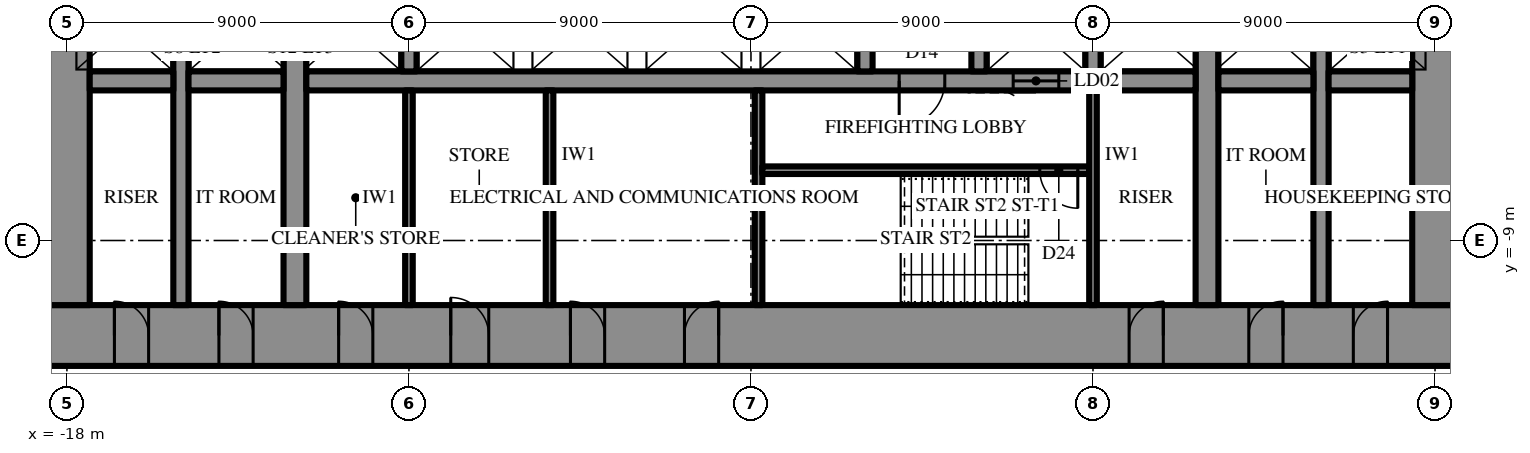
"""IFC4 building model, lengths in metres.
Left out: names, types, materials, properties, quantities, classifications, styles, units other than length and angle.
Written with IfcOpenShell. Run it as: python <this file> out.ifc"""

import sys

from ifc_helpers import new_model, si_unit, direction, frame, frame_2d, origin, place, context, subcontext, project, spatial, rectangle, extrude, element, fill, save


model = new_model("IFC4")
c1 = context("Model", 3, precision=1e-05, world=origin(), true_north=direction((0.0, 1.0)))
c2 = subcontext(c1, "Body", "Model", "MODEL_VIEW")
j1 = project(units=[si_unit("LENGTHUNIT", "METRE"), si_unit("PLANEANGLEUNIT", "RADIAN")], contexts=[c1])
p1 = place(None, origin())
s1 = spatial("IfcSite", under=j1, at=p1, CompositionType="ELEMENT")
p2 = place(p1, origin())
s2 = spatial("IfcBuilding", under=s1, at=p2, CompositionType="ELEMENT")
p3 = place(p2, frame((0.0, 0.0, -4.5)))
s3 = spatial("IfcBuildingStorey", under=s2, at=p3, CompositionType="ELEMENT", Elevation=-4.5)
p4 = place(p3, frame((18.6, -11.5, 0.0), z_axis=(0.0, 0.0, 1.0), x_axis=(-1.0, 0.0, 0.0)))
e1 = element("IfcWall", 1, at=p4, inside=s3, PredefinedType="SHEAR", context=c2, shape_type="SweptSolid", body=[
    extrude(rectangle(XDim=37.2, YDim=1.6, at=frame_2d((18.6, 0.0))), origin(), (0.0, 0.0, 1.0), 4.5),
])
p5 = place(p4, frame((19.45, 0.0, 0.0)))
e2 = element("IfcOpeningElement", 2, at=p5, cuts=e1, PredefinedType="OPENING", context=c2, shape_type="SweptSolid", body=[
    extrude(rectangle(XDim=0.9, YDim=2.2, at=frame_2d((0.45, 1.1))), frame((0.0, 0.81, 0.0), z_axis=(0.0, -1.0, 0.0), x_axis=(1.0, 0.0, 0.0)), (0.0, 0.0, 1.0), 1.62),
])
p6 = place(p4, frame((22.45, 0.0, 0.0)))
e3 = element("IfcOpeningElement", 3, at=p6, cuts=e1, PredefinedType="OPENING", context=c2, shape_type="SweptSolid", body=[
    extrude(rectangle(XDim=0.9, YDim=2.2, at=frame_2d((0.45, 1.1))), frame((0.0, 0.81, 0.0), z_axis=(0.0, -1.0, 0.0), x_axis=(1.0, 0.0, 0.0)), (0.0, 0.0, 1.0), 1.62),
])
p7 = place(p4, frame((25.5, 0.0, 0.0)))
e4 = element("IfcOpeningElement", 4, at=p7, cuts=e1, PredefinedType="OPENING", context=c2, shape_type="SweptSolid", body=[
    extrude(rectangle(XDim=1.0, YDim=2.2, at=frame_2d((0.5, 1.1))), frame((0.0, 0.81, 0.0), z_axis=(0.0, -1.0, 0.0), x_axis=(1.0, 0.0, 0.0)), (0.0, 0.0, 1.0), 1.62),
])
p8 = place(p4, frame((1.85, 0.0, 0.0)))
e5 = element("IfcOpeningElement", 5, at=p8, cuts=e1, PredefinedType="OPENING", context=c2, shape_type="SweptSolid", body=[
    extrude(rectangle(XDim=0.9, YDim=2.2, at=frame_2d((0.45, 1.1))), frame((0.0, 0.81, 0.0), z_axis=(0.0, -1.0, 0.0), x_axis=(1.0, 0.0, 0.0)), (0.0, 0.0, 1.0), 1.62),
])
p9 = place(p4, frame((4.6, 0.0, 0.0)))
e6 = element("IfcOpeningElement", 6, at=p9, cuts=e1, PredefinedType="OPENING", context=c2, shape_type="SweptSolid", body=[
    extrude(rectangle(XDim=0.9, YDim=2.2, at=frame_2d((0.45, 1.1))), frame((0.0, 0.81, 0.0), z_axis=(0.0, -1.0, 0.0), x_axis=(1.0, 0.0, 0.0)), (0.0, 0.0, 1.0), 1.62),
])
p10 = place(p4, frame((7.75, 0.0, 0.0)))
e7 = element("IfcOpeningElement", 7, at=p10, cuts=e1, PredefinedType="OPENING", context=c2, shape_type="SweptSolid", body=[
    extrude(rectangle(XDim=0.9, YDim=2.2, at=frame_2d((0.45, 1.1))), frame((0.0, 0.81, 0.0), z_axis=(0.0, -1.0, 0.0), x_axis=(1.0, 0.0, 0.0)), (0.0, 0.0, 1.0), 1.62),
])
p11 = place(p4, frame((28.55, 0.0, 0.0)))
e8 = element("IfcOpeningElement", 8, at=p11, cuts=e1, PredefinedType="OPENING", context=c2, shape_type="SweptSolid", body=[
    extrude(rectangle(XDim=0.9, YDim=2.2, at=frame_2d((0.45, 1.1))), frame((0.0, 0.81, 0.0), z_axis=(0.0, -1.0, 0.0), x_axis=(1.0, 0.0, 0.0)), (0.0, 0.0, 1.0), 1.62),
])
p12 = place(p4, frame((31.7, 0.0, 0.0)))
e9 = element("IfcOpeningElement", 9, at=p12, cuts=e1, PredefinedType="OPENING", context=c2, shape_type="SweptSolid", body=[
    extrude(rectangle(XDim=0.9, YDim=2.2, at=frame_2d((0.45, 1.1))), frame((0.0, 0.81, 0.0), z_axis=(0.0, -1.0, 0.0), x_axis=(1.0, 0.0, 0.0)), (0.0, 0.0, 1.0), 1.62),
])
p13 = place(p4, frame((34.45, 0.0, 0.0)))
e10 = element("IfcOpeningElement", 10, at=p13, cuts=e1, PredefinedType="OPENING", context=c2, shape_type="SweptSolid", body=[
    extrude(rectangle(XDim=0.9, YDim=2.2, at=frame_2d((0.45, 1.1))), frame((0.0, 0.81, 0.0), z_axis=(0.0, -1.0, 0.0), x_axis=(1.0, 0.0, 0.0)), (0.0, 0.0, 1.0), 1.62),
])
p14 = place(p3, frame((18.0, -10.7, 0.0), z_axis=(0.0, 0.0, 1.0), x_axis=(0.0, 1.0, 0.0)))
e11 = element("IfcWall", 11, at=p14, inside=s3, PredefinedType="SHEAR", context=c2, shape_type="SweptSolid", body=[
    extrude(rectangle(XDim=21.4, YDim=1.2, at=frame_2d((10.7, 0.0))), origin(), (0.0, 0.0, 1.0), 4.5),
])
p15 = place(p14, frame((9.8, 0.0, 0.0)))
e12 = element("IfcOpeningElement", 12, at=p15, cuts=e11, PredefinedType="OPENING", context=c2, shape_type="SweptSolid", body=[
    extrude(rectangle(XDim=1.8, YDim=2.4, at=frame_2d((0.9, 1.2))), frame((0.0, 0.61, 0.0), z_axis=(0.0, -1.0, 0.0), x_axis=(1.0, 0.0, 0.0)), (0.0, 0.0, 1.0), 1.22),
])
p16 = place(p3, frame((-18.0, 10.7, 0.0), z_axis=(0.0, 0.0, 1.0), x_axis=(0.0, -1.0, 0.0)))
e13 = element("IfcWall", 13, at=p16, inside=s3, PredefinedType="SHEAR", context=c2, shape_type="SweptSolid", body=[
    extrude(rectangle(XDim=21.4, YDim=1.2, at=frame_2d((10.7, 0.0))), origin(), (0.0, 0.0, 1.0), 4.5),
])
p17 = place(p16, frame((9.8, 0.0, 0.0)))
e14 = element("IfcOpeningElement", 14, at=p17, cuts=e13, PredefinedType="OPENING", context=c2, shape_type="SweptSolid", body=[
    extrude(rectangle(XDim=1.8, YDim=2.4, at=frame_2d((0.9, 1.2))), frame((0.0, 0.61, 0.0), z_axis=(0.0, -1.0, 0.0), x_axis=(1.0, 0.0, 0.0)), (0.0, 0.0, 1.0), 1.22),
])
p18 = place(p3, frame((12.0, -10.7, 0.0), z_axis=(0.0, 0.0, 1.0), x_axis=(0.0, 1.0, 0.0)))
e15 = element("IfcWall", 15, at=p18, inside=s3, PredefinedType="SHEAR", context=c2, shape_type="SweptSolid", body=[
    extrude(rectangle(XDim=21.4, YDim=0.6, at=frame_2d((10.7, 0.0))), origin(), (0.0, 0.0, 1.0), 4.5),
])
p19 = place(p18, frame((9.8, 0.0, 0.0)))
e16 = element("IfcOpeningElement", 16, at=p19, cuts=e15, PredefinedType="OPENING", context=c2, shape_type="SweptSolid", body=[
    extrude(rectangle(XDim=1.8, YDim=2.4, at=frame_2d((0.9, 1.2))), frame((0.0, 0.31, 0.0), z_axis=(0.0, -1.0, 0.0), x_axis=(1.0, 0.0, 0.0)), (0.0, 0.0, 1.0), 0.62),
])
p20 = place(p3, frame((-12.0, -10.7, 0.0), z_axis=(0.0, 0.0, 1.0), x_axis=(0.0, 1.0, 0.0)))
e17 = element("IfcWall", 17, at=p20, inside=s3, PredefinedType="SHEAR", context=c2, shape_type="SweptSolid", body=[
    extrude(rectangle(XDim=21.4, YDim=0.6, at=frame_2d((10.7, 0.0))), origin(), (0.0, 0.0, 1.0), 4.5),
])
p21 = place(p20, frame((9.8, 0.0, 0.0)))
e18 = element("IfcOpeningElement", 18, at=p21, cuts=e17, PredefinedType="OPENING", context=c2, shape_type="SweptSolid", body=[
    extrude(rectangle(XDim=1.8, YDim=2.4, at=frame_2d((0.9, 1.2))), frame((0.0, 0.31, 0.0), z_axis=(0.0, -1.0, 0.0), x_axis=(1.0, 0.0, 0.0)), (0.0, 0.0, 1.0), 0.62),
])
p22 = place(p3, frame((15.0, -10.7, 0.0), z_axis=(0.0, 0.0, 1.0), x_axis=(0.0, 1.0, 0.0)))
e19 = element("IfcWall", 19, at=p22, inside=s3, PredefinedType="SHEAR", context=c2, shape_type="SweptSolid", body=[
    extrude(rectangle(XDim=21.4, YDim=0.4, at=frame_2d((10.7, 0.0))), origin(), (0.0, 0.0, 1.0), 4.5),
])
p23 = place(p22, frame((9.8, 0.0, 0.0)))
e20 = element("IfcOpeningElement", 20, at=p23, cuts=e19, PredefinedType="OPENING", context=c2, shape_type="SweptSolid", body=[
    extrude(rectangle(XDim=1.8, YDim=2.4, at=frame_2d((0.9, 1.2))), frame((0.0, 0.21, 0.0), z_axis=(0.0, -1.0, 0.0), x_axis=(1.0, 0.0, 0.0)), (0.0, 0.0, 1.0), 0.42),
])
p24 = place(p3, frame((-15.0, -10.7, 0.0), z_axis=(0.0, 0.0, 1.0), x_axis=(0.0, 1.0, 0.0)))
e21 = element("IfcWall", 21, at=p24, inside=s3, PredefinedType="SHEAR", context=c2, shape_type="SweptSolid", body=[
    extrude(rectangle(XDim=21.4, YDim=0.4, at=frame_2d((10.7, 0.0))), origin(), (0.0, 0.0, 1.0), 4.5),
])
p25 = place(p24, frame((9.8, 0.0, 0.0)))
e22 = element("IfcOpeningElement", 22, at=p25, cuts=e21, PredefinedType="OPENING", context=c2, shape_type="SweptSolid", body=[
    extrude(rectangle(XDim=1.8, YDim=2.4, at=frame_2d((0.9, 1.2))), frame((0.0, 0.21, 0.0), z_axis=(0.0, -1.0, 0.0), x_axis=(1.0, 0.0, 0.0)), (0.0, 0.0, 1.0), 0.42),
])
p26 = place(p3, frame((17.4, -4.8, 0.0), z_axis=(0.0, 0.0, 1.0), x_axis=(-1.0, 0.0, 0.0)))
e23 = element("IfcWall", 23, at=p26, inside=s3, PredefinedType="SHEAR", context=c2, shape_type="SweptSolid", body=[
    extrude(rectangle(XDim=2.2, YDim=0.5, at=frame_2d((1.1, 0.0))), origin(), (0.0, 0.0, 1.0), 4.5),
])
p27 = place(p3, frame((14.8, -4.8, 0.0), z_axis=(0.0, 0.0, 1.0), x_axis=(-1.0, 0.0, 0.0)))
e24 = element("IfcWall", 24, at=p27, inside=s3, PredefinedType="SHEAR", context=c2, shape_type="SweptSolid", body=[
    extrude(rectangle(XDim=2.5, YDim=0.5, at=frame_2d((1.25, 0.0))), origin(), (0.0, 0.0, 1.0), 4.5),
])
p28 = place(p3, frame((11.7, -4.8, 0.0), z_axis=(0.0, 0.0, 1.0), x_axis=(-1.0, 0.0, 0.0)))
e25 = element("IfcWall", 25, at=p28, inside=s3, PredefinedType="SHEAR", context=c2, shape_type="SweptSolid", body=[
    extrude(rectangle(XDim=23.4, YDim=0.5, at=frame_2d((11.7, 0.0))), origin(), (0.0, 0.0, 1.0), 4.5),
])
p29 = place(p28, frame((6.6, 0.0, 0.0)))
e26 = element("IfcOpeningElement", 26, at=p29, cuts=e25, PredefinedType="OPENING", context=c2, shape_type="SweptSolid", body=[
    extrude(rectangle(XDim=1.2, YDim=2.2, at=frame_2d((0.6, 1.1))), frame((0.0, 0.26, 0.0), z_axis=(0.0, -1.0, 0.0), x_axis=(1.0, 0.0, 0.0)), (0.0, 0.0, 1.0), 0.52),
])
p30 = place(p28, frame((3.6, 0.0, 0.0)))
e27 = element("IfcOpeningElement", 27, at=p30, cuts=e25, PredefinedType="OPENING", context=c2, shape_type="SweptSolid", body=[
    extrude(rectangle(XDim=1.2, YDim=2.2, at=frame_2d((0.6, 1.1))), frame((0.0, 0.26, 0.0), z_axis=(0.0, -1.0, 0.0), x_axis=(1.0, 0.0, 0.0)), (0.0, 0.0, 1.0), 0.52),
])
p31 = place(p3, frame((-12.3, -4.8, 0.0), z_axis=(0.0, 0.0, 1.0), x_axis=(-1.0, 0.0, 0.0)))
e28 = element("IfcWall", 28, at=p31, inside=s3, PredefinedType="SHEAR", context=c2, shape_type="SweptSolid", body=[
    extrude(rectangle(XDim=2.5, YDim=0.5, at=frame_2d((1.25, 0.0))), origin(), (0.0, 0.0, 1.0), 4.5),
])
p32 = place(p3, frame((-15.2, -4.8, 0.0), z_axis=(0.0, 0.0, 1.0), x_axis=(-1.0, 0.0, 0.0)))
e29 = element("IfcWall", 29, at=p32, inside=s3, PredefinedType="SHEAR", context=c2, shape_type="SweptSolid", body=[
    extrude(rectangle(XDim=2.2, YDim=0.5, at=frame_2d((1.1, 0.0))), origin(), (0.0, 0.0, 1.0), 4.5),
])
for number, where, z_axis, x_axis in (
    (30, (9.0, -2.25, 0.0), (0.0, 0.0, 1.0), (0.0, -1.0, 0.0)),
    (31, (6.0, -2.25, 0.0), (0.0, 0.0, 1.0), (0.0, -1.0, 0.0)),
    (32, (3.0, -2.25, 0.0), (0.0, 0.0, 1.0), (0.0, -1.0, 0.0)),
    (33, (-9.0, -2.25, 0.0), (0.0, 0.0, 1.0), (0.0, -1.0, 0.0)),
):
    element("IfcWall", number, at=place(p3, frame(where, z_axis=z_axis, x_axis=x_axis)), inside=s3, PredefinedType="SHEAR", context=c2, shape_type="SweptSolid", body=[
        extrude(rectangle(XDim=2.3, YDim=0.4, at=frame_2d((1.15, 0.0))), origin(), (0.0, 0.0, 1.0), 4.5),
    ])
p33 = place(p3, frame((0.2, -5.05, 0.0), z_axis=(0.0, 0.0, 1.0), x_axis=(0.0, -1.0, 0.0)))
e34 = element("IfcWall", 34, at=p33, inside=s3, PredefinedType="SHEAR", context=c2, shape_type="SweptSolid", body=[
    extrude(rectangle(XDim=5.65, YDim=0.2, at=frame_2d((2.825, 0.0))), origin(), (0.0, 0.0, 1.0), 4.5),
])
p34 = place(p3, frame((8.9, -7.15, 0.0), z_axis=(0.0, 0.0, 1.0), x_axis=(-1.0, 0.0, 0.0)))
e35 = element("IfcWall", 35, at=p34, inside=s3, PredefinedType="SHEAR", context=c2, shape_type="SweptSolid", body=[
    extrude(rectangle(XDim=8.6, YDim=0.2, at=frame_2d((4.3, 0.0))), origin(), (0.0, 0.0, 1.0), 4.5),
])
p35 = place(p34, frame((0.3, 0.0, 0.0)))
e36 = element("IfcOpeningElement", 36, at=p35, cuts=e35, PredefinedType="OPENING", context=c2, shape_type="SweptSolid", body=[
    extrude(rectangle(XDim=1.0, YDim=2.2, at=frame_2d((0.5, 1.1))), frame((0.0, 0.11, 0.0), z_axis=(0.0, -1.0, 0.0), x_axis=(1.0, 0.0, 0.0)), (0.0, 0.0, 1.0), 0.22),
])
for number, where, z_axis, x_axis in (
    (37, (9.0, -5.05, 0.0), (0.0, 0.0, 1.0), (0.0, -1.0, 0.0)),
    (38, (-9.0, -5.05, 0.0), (0.0, 0.0, 1.0), (0.0, -1.0, 0.0)),
    (39, (-5.3, -5.05, 0.0), (0.0, 0.0, 1.0), (0.0, -1.0, 0.0)),
):
    element("IfcWall", number, at=place(p3, frame(where, z_axis=z_axis, x_axis=x_axis)), inside=s3, PredefinedType="PARTITIONING", context=c2, shape_type="SweptSolid", body=[
        extrude(rectangle(XDim=5.65, YDim=0.2, at=frame_2d((2.825, 0.0))), origin(), (0.0, 0.0, 1.0), 4.15),
    ])
p36 = place(p29, origin())
e40 = element("IfcDoor", 40, at=p36, inside=s3, OperationType="SINGLE_SWING_LEFT", PredefinedType="DOOR", context=c2, shape_type="SweptSolid", body=[
    extrude(rectangle(XDim=1.2, YDim=2.2, at=frame_2d((0.6, 1.1))), frame((0.0, 0.025, 0.0), z_axis=(0.0, -1.0, 0.0), x_axis=(1.0, 0.0, 0.0)), (0.0, 0.0, 1.0), 0.05),
])
fill(e26, e40)
p37 = place(p35, origin())
e41 = element("IfcDoor", 41, at=p37, inside=s3, OperationType="SINGLE_SWING_RIGHT", PredefinedType="DOOR", context=c2, shape_type="SweptSolid", body=[
    extrude(rectangle(XDim=1.0, YDim=2.2, at=frame_2d((0.5, 1.1))), frame((0.0, 0.025, 0.0), z_axis=(0.0, -1.0, 0.0), x_axis=(1.0, 0.0, 0.0)), (0.0, 0.0, 1.0), 0.05),
])
fill(e36, e41)
p38 = place(p5, frame((0.9, 0.0, 0.0), z_axis=(0.0, 0.0, 1.0), x_axis=(-1.0, 0.0, 0.0)))
e42 = element("IfcDoor", 42, at=p38, inside=s3, OperationType="SINGLE_SWING_LEFT", PredefinedType="DOOR", context=c2, shape_type="SweptSolid", body=[
    extrude(rectangle(XDim=0.9, YDim=2.2, at=frame_2d((0.45, 1.1))), frame((0.0, 0.025, 0.0), z_axis=(0.0, -1.0, 0.0), x_axis=(1.0, 0.0, 0.0)), (0.0, 0.0, 1.0), 0.05),
])
fill(e2, e42)
p39 = place(p6, frame((0.9, 0.0, 0.0), z_axis=(0.0, 0.0, 1.0), x_axis=(-1.0, 0.0, 0.0)))
e43 = element("IfcDoor", 43, at=p39, inside=s3, OperationType="SINGLE_SWING_RIGHT", PredefinedType="DOOR", context=c2, shape_type="SweptSolid", body=[
    extrude(rectangle(XDim=0.9, YDim=2.2, at=frame_2d((0.45, 1.1))), frame((0.0, 0.025, 0.0), z_axis=(0.0, -1.0, 0.0), x_axis=(1.0, 0.0, 0.0)), (0.0, 0.0, 1.0), 0.05),
])
fill(e3, e43)
p40 = place(p7, frame((1.0, 0.0, 0.0), z_axis=(0.0, 0.0, 1.0), x_axis=(-1.0, 0.0, 0.0)))
e44 = element("IfcDoor", 44, at=p40, inside=s3, OperationType="SINGLE_SWING_RIGHT", PredefinedType="DOOR", context=c2, shape_type="SweptSolid", body=[
    extrude(rectangle(XDim=1.0, YDim=2.2, at=frame_2d((0.5, 1.1))), frame((0.0, 0.025, 0.0), z_axis=(0.0, -1.0, 0.0), x_axis=(1.0, 0.0, 0.0)), (0.0, 0.0, 1.0), 0.05),
])
fill(e4, e44)
p41 = place(p8, frame((0.9, 0.0, 0.0), z_axis=(0.0, 0.0, 1.0), x_axis=(-1.0, 0.0, 0.0)))
e45 = element("IfcDoor", 45, at=p41, inside=s3, OperationType="SINGLE_SWING_LEFT", PredefinedType="DOOR", context=c2, shape_type="SweptSolid", body=[
    extrude(rectangle(XDim=0.9, YDim=2.2, at=frame_2d((0.45, 1.1))), frame((0.0, 0.025, 0.0), z_axis=(0.0, -1.0, 0.0), x_axis=(1.0, 0.0, 0.0)), (0.0, 0.0, 1.0), 0.05),
])
fill(e5, e45)
p42 = place(p9, frame((0.9, 0.0, 0.0), z_axis=(0.0, 0.0, 1.0), x_axis=(-1.0, 0.0, 0.0)))
e46 = element("IfcDoor", 46, at=p42, inside=s3, OperationType="SINGLE_SWING_LEFT", PredefinedType="DOOR", context=c2, shape_type="SweptSolid", body=[
    extrude(rectangle(XDim=0.9, YDim=2.2, at=frame_2d((0.45, 1.1))), frame((0.0, 0.025, 0.0), z_axis=(0.0, -1.0, 0.0), x_axis=(1.0, 0.0, 0.0)), (0.0, 0.0, 1.0), 0.05),
])
fill(e6, e46)
p43 = place(p10, frame((0.9, 0.0, 0.0), z_axis=(0.0, 0.0, 1.0), x_axis=(-1.0, 0.0, 0.0)))
e47 = element("IfcDoor", 47, at=p43, inside=s3, OperationType="SINGLE_SWING_LEFT", PredefinedType="DOOR", context=c2, shape_type="SweptSolid", body=[
    extrude(rectangle(XDim=0.9, YDim=2.2, at=frame_2d((0.45, 1.1))), frame((0.0, 0.025, 0.0), z_axis=(0.0, -1.0, 0.0), x_axis=(1.0, 0.0, 0.0)), (0.0, 0.0, 1.0), 0.05),
])
fill(e7, e47)
p44 = place(p11, frame((0.9, 0.0, 0.0), z_axis=(0.0, 0.0, 1.0), x_axis=(-1.0, 0.0, 0.0)))
e48 = element("IfcDoor", 48, at=p44, inside=s3, OperationType="SINGLE_SWING_RIGHT", PredefinedType="DOOR", context=c2, shape_type="SweptSolid", body=[
    extrude(rectangle(XDim=0.9, YDim=2.2, at=frame_2d((0.45, 1.1))), frame((0.0, 0.025, 0.0), z_axis=(0.0, -1.0, 0.0), x_axis=(1.0, 0.0, 0.0)), (0.0, 0.0, 1.0), 0.05),
])
fill(e8, e48)
p45 = place(p12, frame((0.9, 0.0, 0.0), z_axis=(0.0, 0.0, 1.0), x_axis=(-1.0, 0.0, 0.0)))
e49 = element("IfcDoor", 49, at=p45, inside=s3, OperationType="SINGLE_SWING_RIGHT", PredefinedType="DOOR", context=c2, shape_type="SweptSolid", body=[
    extrude(rectangle(XDim=0.9, YDim=2.2, at=frame_2d((0.45, 1.1))), frame((0.0, 0.025, 0.0), z_axis=(0.0, -1.0, 0.0), x_axis=(1.0, 0.0, 0.0)), (0.0, 0.0, 1.0), 0.05),
])
fill(e9, e49)
p46 = place(p13, frame((0.9, 0.0, 0.0), z_axis=(0.0, 0.0, 1.0), x_axis=(-1.0, 0.0, 0.0)))
e50 = element("IfcDoor", 50, at=p46, inside=s3, OperationType="SINGLE_SWING_RIGHT", PredefinedType="DOOR", context=c2, shape_type="SweptSolid", body=[
    extrude(rectangle(XDim=0.9, YDim=2.2, at=frame_2d((0.45, 1.1))), frame((0.0, 0.025, 0.0), z_axis=(0.0, -1.0, 0.0), x_axis=(1.0, 0.0, 0.0)), (0.0, 0.0, 1.0), 0.05),
])
fill(e10, e50)
p47 = place(p30, origin())
e51 = element("IfcDoor", 51, at=p47, inside=s3, OperationType="SLIDING_TO_LEFT", PredefinedType="DOOR", context=c2, shape_type="SweptSolid", body=[
    extrude(rectangle(XDim=1.2, YDim=2.2, at=frame_2d((0.6, 1.1))), frame((0.0, 0.025, 0.0), z_axis=(0.0, -1.0, 0.0), x_axis=(1.0, 0.0, 0.0)), (0.0, 0.0, 1.0), 0.05),
])
fill(e27, e51)
save(model, sys.argv[1])
